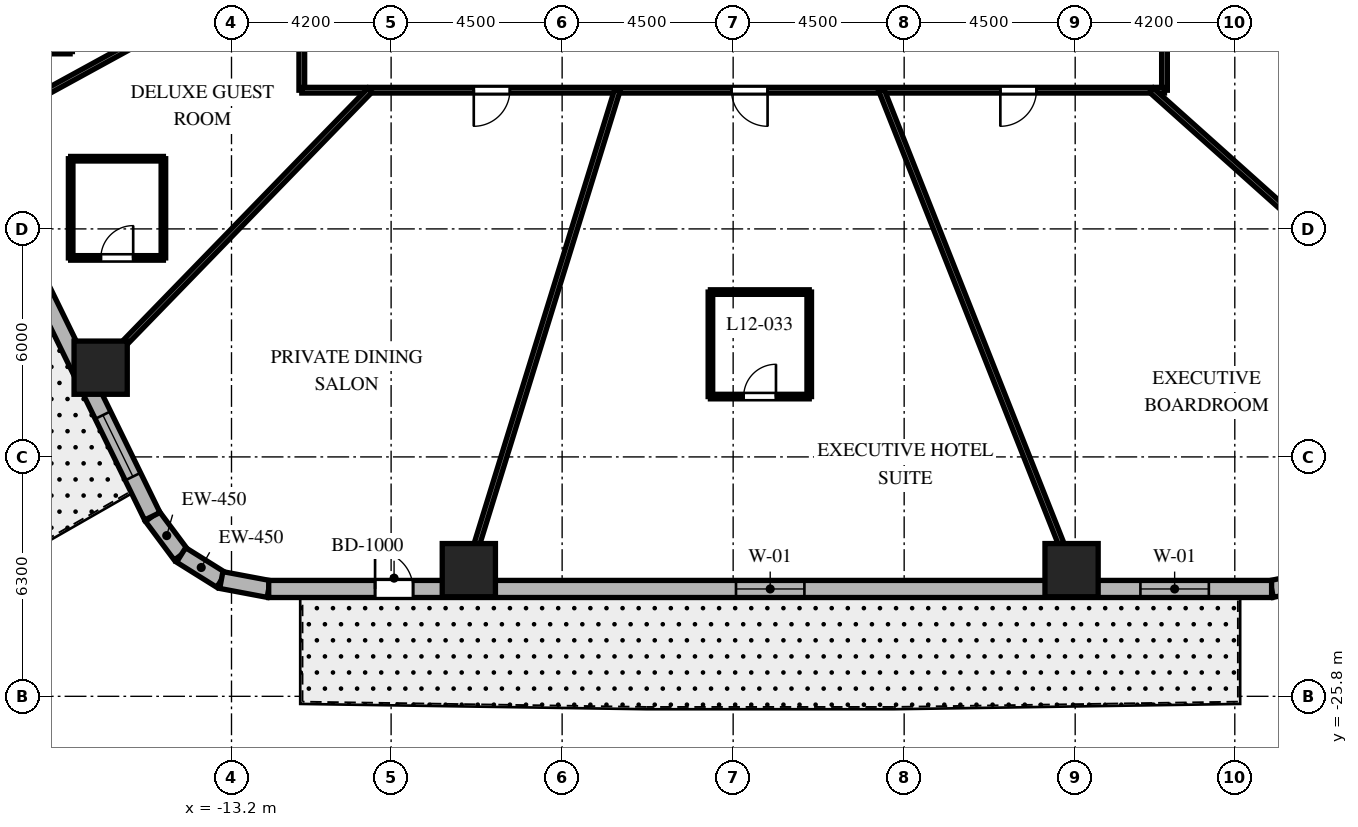
"""IFC4 building model, lengths in metres.
Left out: names, types, materials, properties, quantities, classifications, styles, units other than length and angle.
Written with IfcOpenShell. Run it as: python <this file> out.ifc"""

import sys

from ifc_helpers import new_model, si_unit, direction, frame, frame_2d, origin, origin_2d, place, context, subcontext, project, spatial, rectangle, extrude, element, fill, save


model = new_model("IFC4")
c1 = context("Model", 3, precision=1e-05, world=origin(), true_north=direction((0.0, 1.0)))
c2 = subcontext(c1, "Body", "Model", "MODEL_VIEW")
j1 = project(units=[si_unit("LENGTHUNIT", "METRE"), si_unit("PLANEANGLEUNIT", "RADIAN")], contexts=[c1])
p1 = place(None, origin())
s1 = spatial("IfcSite", under=j1, at=p1, CompositionType="ELEMENT")
p2 = place(p1, origin())
s2 = spatial("IfcBuilding", under=s1, at=p2, CompositionType="ELEMENT")
p3 = place(p2, frame((0.0, 0.0, 56.4)))
s3 = spatial("IfcBuildingStorey", under=s2, at=p3, CompositionType="ELEMENT", Elevation=56.4)
for number, where, z_axis, x_axis in (
    (1, (-6.955, -22.48, 0.0), (0.0, 0.0, 1.0), (1.0, 0.0, 0.0)),
    (2, (8.905, -22.48, 0.0), (0.0, 0.0, 1.0), (1.0, 0.0, 0.0)),
    (3, (-16.643, -17.152, 0.0), (0.0, 0.0, 1.0), (1.0, 0.0, 0.0)),
):
    element("IfcColumn", number, at=place(p3, frame(where, z_axis=z_axis, x_axis=x_axis)), inside=s3, PredefinedType="COLUMN", context=c2, shape_type="SweptSolid", body=[
        extrude(rectangle(XDim=1.4, YDim=1.4, at=origin_2d()), origin(), (0.0, 0.0, 1.0), 3.7),
    ])
p4 = place(p3, frame((-15.284, -21.062, 0.0), z_axis=(0.0, 0.0, 1.0), x_axis=(0.597595366449, -0.801797841104, 0.0)))
e4 = element("IfcWall", 4, at=p4, inside=s3, PredefinedType="SOLIDWALL", context=c2, shape_type="SweptSolid", body=[
    extrude(rectangle(XDim=1.269, YDim=0.45, at=frame_2d((0.634, 0.0))), origin(), (0.0, 0.0, 1.0), 3.4),
])
p5 = place(p3, frame((-14.526, -22.08, 0.0), z_axis=(0.0, 0.0, 1.0), x_axis=(0.848185203596, -0.529699783275, 0.0)))
e5 = element("IfcWall", 5, at=p5, inside=s3, PredefinedType="SOLIDWALL", context=c2, shape_type="SweptSolid", body=[
    extrude(rectangle(XDim=1.247, YDim=0.45, at=frame_2d((0.624, 0.0))), origin(), (0.0, 0.0, 1.0), 3.4),
])
p6 = place(p3, frame((-13.468, -22.74, 0.0), z_axis=(0.0, 0.0, 1.0), x_axis=(0.982717174228, -0.185113358451, 0.0)))
e6 = element("IfcWall", 6, at=p6, inside=s3, PredefinedType="SOLIDWALL", context=c2, shape_type="SweptSolid", body=[
    extrude(rectangle(XDim=1.269, YDim=0.45, at=frame_2d((0.634, 0.0))), origin(), (0.0, 0.0, 1.0), 3.4),
])
p7 = place(p3, frame((14.168, -22.975, 0.0), z_axis=(0.0, 0.0, 1.0), x_axis=(0.978770371074, 0.204959900243, 0.0)))
e7 = element("IfcWall", 7, at=p7, inside=s3, PredefinedType="SOLIDWALL", context=c2, shape_type="SweptSolid", body=[
    extrude(rectangle(XDim=1.406, YDim=0.45, at=frame_2d((0.703, 0.0))), origin(), (0.0, 0.0, 1.0), 3.4),
])
p8 = place(p3, frame((-12.221, -22.975, 0.0), z_axis=(0.0, 0.0, 1.0), x_axis=(1.0, 0.0, 0.0)))
e8 = element("IfcWall", 8, at=p8, inside=s3, PredefinedType="SOLIDWALL", context=c2, shape_type="SweptSolid", body=[
    extrude(rectangle(XDim=26.389, YDim=0.45, at=frame_2d((13.195, 0.0))), origin(), (0.0, 0.0, 1.0), 3.4),
])
p9 = place(p8, frame((2.799, 0.0, 0.0)))
e9 = element("IfcOpeningElement", 9, at=p9, cuts=e8, PredefinedType="OPENING", context=c2, shape_type="SweptSolid", body=[
    extrude(rectangle(XDim=1.0, YDim=2.15, at=frame_2d((0.5, 1.075))), frame((0.0, 0.235, 0.0), z_axis=(0.0, -1.0, 0.0), x_axis=(1.0, 0.0, 0.0)), (0.0, 0.0, 1.0), 0.47),
])
p10 = place(p8, frame((12.296, 0.0, 0.8)))
e10 = element("IfcOpeningElement", 10, at=p10, cuts=e8, PredefinedType="OPENING", context=c2, shape_type="SweptSolid", body=[
    extrude(rectangle(XDim=1.8, YDim=1.8, at=frame_2d((0.9, 0.9))), frame((0.0, 0.235, 0.0), z_axis=(0.0, -1.0, 0.0), x_axis=(1.0, 0.0, 0.0)), (0.0, 0.0, 1.0), 0.47),
])
p11 = place(p8, frame((22.938, 0.0, 0.8)))
e11 = element("IfcOpeningElement", 11, at=p11, cuts=e8, PredefinedType="OPENING", context=c2, shape_type="SweptSolid", body=[
    extrude(rectangle(XDim=1.8, YDim=1.8, at=frame_2d((0.9, 0.9))), frame((0.0, 0.235, 0.0), z_axis=(0.0, -1.0, 0.0), x_axis=(1.0, 0.0, 0.0)), (0.0, 0.0, 1.0), 0.47),
])
p12 = place(p3, frame((-24.336, -2.532, 0.0), z_axis=(0.0, 0.0, 1.0), x_axis=(0.438931326393, -0.898520612291, 0.0)))
e12 = element("IfcWall", 12, at=p12, inside=s3, PredefinedType="SOLIDWALL", context=c2, shape_type="SweptSolid", body=[
    extrude(rectangle(XDim=20.623, YDim=0.45, at=frame_2d((10.312, 0.0))), origin(), (0.0, 0.0, 1.0), 3.4),
])
p13 = place(p12, frame((5.171, 0.0, 0.0)))
e13 = element("IfcOpeningElement", 13, at=p13, cuts=e12, PredefinedType="OPENING", context=c2, shape_type="SweptSolid", body=[
    extrude(rectangle(XDim=0.95, YDim=2.15, at=frame_2d((0.475, 1.075))), frame((0.0, 0.235, 0.0), z_axis=(0.0, -1.0, 0.0), x_axis=(1.0, 0.0, 0.0)), (0.0, 0.0, 1.0), 0.47),
])
p14 = place(p12, frame((1.214, 0.0, 0.8)))
e14 = element("IfcOpeningElement", 14, at=p14, cuts=e12, PredefinedType="OPENING", context=c2, shape_type="SweptSolid", body=[
    extrude(rectangle(XDim=1.8, YDim=1.8, at=frame_2d((0.9, 0.9))), frame((0.0, 0.235, 0.0), z_axis=(0.0, -1.0, 0.0), x_axis=(1.0, 0.0, 0.0)), (0.0, 0.0, 1.0), 0.47),
])
p15 = place(p12, frame((6.8, 0.0, 0.8)))
e15 = element("IfcOpeningElement", 15, at=p15, cuts=e12, PredefinedType="OPENING", context=c2, shape_type="SweptSolid", body=[
    extrude(rectangle(XDim=1.8, YDim=1.8, at=frame_2d((0.9, 0.9))), frame((0.0, 0.235, 0.0), z_axis=(0.0, -1.0, 0.0), x_axis=(1.0, 0.0, 0.0)), (0.0, 0.0, 1.0), 0.47),
])
p16 = place(p12, frame((11.942, 0.0, 0.8)))
e16 = element("IfcOpeningElement", 16, at=p16, cuts=e12, PredefinedType="OPENING", context=c2, shape_type="SweptSolid", body=[
    extrude(rectangle(XDim=1.8, YDim=1.8, at=frame_2d((0.9, 0.9))), frame((0.0, 0.235, 0.0), z_axis=(0.0, -1.0, 0.0), x_axis=(1.0, 0.0, 0.0)), (0.0, 0.0, 1.0), 0.47),
])
p17 = place(p12, frame((17.66, 0.0, 0.8)))
e17 = element("IfcOpeningElement", 17, at=p17, cuts=e12, PredefinedType="OPENING", context=c2, shape_type="SweptSolid", body=[
    extrude(rectangle(XDim=1.8, YDim=1.8, at=frame_2d((0.9, 0.9))), frame((0.0, 0.235, 0.0), z_axis=(0.0, -1.0, 0.0), x_axis=(1.0, 0.0, 0.0)), (0.0, 0.0, 1.0), 0.47),
])
p18 = place(p3, frame((-11.35, -9.85, 0.0), z_axis=(0.0, 0.0, 1.0), x_axis=(0.0, 1.0, 0.0)))
e18 = element("IfcWall", 18, at=p18, inside=s3, PredefinedType="PARTITIONING", context=c2, shape_type="SweptSolid", body=[
    extrude(rectangle(XDim=19.7, YDim=0.15, at=frame_2d((9.85, 0.0))), origin(), (0.0, 0.0, 1.0), 2.84),
])
p19 = place(p18, frame((15.191, 0.0, 0.0)))
e19 = element("IfcOpeningElement", 19, at=p19, cuts=e18, PredefinedType="OPENING", context=c2, shape_type="SweptSolid", body=[
    extrude(rectangle(XDim=0.95, YDim=2.03, at=frame_2d((0.475, 1.015))), frame((0.0, 0.085, 0.0), z_axis=(0.0, -1.0, 0.0), x_axis=(1.0, 0.0, 0.0)), (0.0, 0.0, 1.0), 0.17),
])
p20 = place(p18, frame((8.838, 0.0, 0.0)))
e20 = element("IfcOpeningElement", 20, at=p20, cuts=e18, PredefinedType="OPENING", context=c2, shape_type="SweptSolid", body=[
    extrude(rectangle(XDim=0.95, YDim=2.03, at=frame_2d((0.475, 1.015))), frame((0.0, 0.085, 0.0), z_axis=(0.0, -1.0, 0.0), x_axis=(1.0, 0.0, 0.0)), (0.0, 0.0, 1.0), 0.17),
])
p21 = place(p18, frame((4.704, 0.0, 0.0)))
e21 = element("IfcOpeningElement", 21, at=p21, cuts=e18, PredefinedType="OPENING", context=c2, shape_type="SweptSolid", body=[
    extrude(rectangle(XDim=0.95, YDim=2.03, at=frame_2d((0.475, 1.015))), frame((0.0, 0.085, 0.0), z_axis=(0.0, -1.0, 0.0), x_axis=(1.0, 0.0, 0.0)), (0.0, 0.0, 1.0), 0.17),
])
p22 = place(p18, frame((1.462, 0.0, 0.0)))
e22 = element("IfcOpeningElement", 22, at=p22, cuts=e18, PredefinedType="OPENING", context=c2, shape_type="SweptSolid", body=[
    extrude(rectangle(XDim=0.95, YDim=2.03, at=frame_2d((0.475, 1.015))), frame((0.0, 0.085, 0.0), z_axis=(0.0, -1.0, 0.0), x_axis=(1.0, 0.0, 0.0)), (0.0, 0.0, 1.0), 0.17),
])
p23 = place(p3, frame((11.35, 9.85, 0.0), z_axis=(0.0, 0.0, 1.0), x_axis=(0.0, -1.0, 0.0)))
e23 = element("IfcWall", 23, at=p23, inside=s3, PredefinedType="PARTITIONING", context=c2, shape_type="SweptSolid", body=[
    extrude(rectangle(XDim=19.7, YDim=0.15, at=frame_2d((9.85, 0.0))), origin(), (0.0, 0.0, 1.0), 2.84),
])
p24 = place(p23, frame((4.704, 0.0, 0.0)))
e24 = element("IfcOpeningElement", 24, at=p24, cuts=e23, PredefinedType="OPENING", context=c2, shape_type="SweptSolid", body=[
    extrude(rectangle(XDim=0.95, YDim=2.03, at=frame_2d((0.475, 1.015))), frame((0.0, 0.085, 0.0), z_axis=(0.0, -1.0, 0.0), x_axis=(1.0, 0.0, 0.0)), (0.0, 0.0, 1.0), 0.17),
])
p25 = place(p23, frame((1.462, 0.0, 0.0)))
e25 = element("IfcOpeningElement", 25, at=p25, cuts=e23, PredefinedType="OPENING", context=c2, shape_type="SweptSolid", body=[
    extrude(rectangle(XDim=0.95, YDim=2.03, at=frame_2d((0.475, 1.015))), frame((0.0, 0.085, 0.0), z_axis=(0.0, -1.0, 0.0), x_axis=(1.0, 0.0, 0.0)), (0.0, 0.0, 1.0), 0.17),
])
p26 = place(p23, frame((15.191, 0.0, 0.0)))
e26 = element("IfcOpeningElement", 26, at=p26, cuts=e23, PredefinedType="OPENING", context=c2, shape_type="SweptSolid", body=[
    extrude(rectangle(XDim=0.95, YDim=2.03, at=frame_2d((0.475, 1.015))), frame((0.0, 0.085, 0.0), z_axis=(0.0, -1.0, 0.0), x_axis=(1.0, 0.0, 0.0)), (0.0, 0.0, 1.0), 0.17),
])
p27 = place(p23, frame((8.838, 0.0, 0.0)))
e27 = element("IfcOpeningElement", 27, at=p27, cuts=e23, PredefinedType="OPENING", context=c2, shape_type="SweptSolid", body=[
    extrude(rectangle(XDim=0.95, YDim=2.03, at=frame_2d((0.475, 1.015))), frame((0.0, 0.085, 0.0), z_axis=(0.0, -1.0, 0.0), x_axis=(1.0, 0.0, 0.0)), (0.0, 0.0, 1.0), 0.17),
])
p28 = place(p3, frame((11.35, -9.85, 0.0), z_axis=(0.0, 0.0, 1.0), x_axis=(-1.0, 0.0, 0.0)))
e28 = element("IfcWall", 28, at=p28, inside=s3, PredefinedType="PARTITIONING", context=c2, shape_type="SweptSolid", body=[
    extrude(rectangle(XDim=22.7, YDim=0.15, at=frame_2d((11.35, 0.0))), origin(), (0.0, 0.0, 1.0), 2.84),
])
p29 = place(p28, frame((17.225, 0.0, 0.0)))
e29 = element("IfcOpeningElement", 29, at=p29, cuts=e28, PredefinedType="OPENING", context=c2, shape_type="SweptSolid", body=[
    extrude(rectangle(XDim=0.95, YDim=2.03, at=frame_2d((0.475, 1.015))), frame((0.0, 0.085, 0.0), z_axis=(0.0, -1.0, 0.0), x_axis=(1.0, 0.0, 0.0)), (0.0, 0.0, 1.0), 0.17),
])
p30 = place(p28, frame((10.444, 0.0, 0.0)))
e30 = element("IfcOpeningElement", 30, at=p30, cuts=e28, PredefinedType="OPENING", context=c2, shape_type="SweptSolid", body=[
    extrude(rectangle(XDim=0.95, YDim=2.03, at=frame_2d((0.475, 1.015))), frame((0.0, 0.085, 0.0), z_axis=(0.0, -1.0, 0.0), x_axis=(1.0, 0.0, 0.0)), (0.0, 0.0, 1.0), 0.17),
])
p31 = place(p28, frame((3.369, 0.0, 0.0)))
e31 = element("IfcOpeningElement", 31, at=p31, cuts=e28, PredefinedType="OPENING", context=c2, shape_type="SweptSolid", body=[
    extrude(rectangle(XDim=0.95, YDim=2.03, at=frame_2d((0.475, 1.015))), frame((0.0, 0.085, 0.0), z_axis=(0.0, -1.0, 0.0), x_axis=(1.0, 0.0, 0.0)), (0.0, 0.0, 1.0), 0.17),
])
p32 = place(p3, frame((-11.35, -6.217, 0.0), z_axis=(0.0, 0.0, 1.0), x_axis=(-0.877047587135, -0.480403507378, 0.0)))
e32 = element("IfcWall", 32, at=p32, inside=s3, PredefinedType="PARTITIONING", context=c2, shape_type="SweptSolid", body=[
    extrude(rectangle(XDim=10.062, YDim=0.15, at=frame_2d((5.031, 0.0))), origin(), (0.0, 0.0, 1.0), 2.54),
])
p33 = place(p3, frame((-9.558, -9.85, 0.0), z_axis=(0.0, 0.0, 1.0), x_axis=(-0.69638346089, -0.717669893056, 0.0)))
e33 = element("IfcWall", 33, at=p33, inside=s3, PredefinedType="PARTITIONING", context=c2, shape_type="SweptSolid", body=[
    extrude(rectangle(XDim=10.701, YDim=0.15, at=frame_2d((5.351, 0.0))), origin(), (0.0, 0.0, 1.0), 2.54),
])
p34 = place(p3, frame((-3.048, -9.85, 0.0), z_axis=(0.0, 0.0, 1.0), x_axis=(-0.295553992761, -0.955326037206, 0.0)))
e34 = element("IfcWall", 34, at=p34, inside=s3, PredefinedType="PARTITIONING", context=c2, shape_type="SweptSolid", body=[
    extrude(rectangle(XDim=13.739, YDim=0.15, at=frame_2d((6.869, 0.0))), origin(), (0.0, 0.0, 1.0), 2.54),
])
p35 = place(p3, frame((3.902, -9.85, 0.0), z_axis=(0.0, 0.0, 1.0), x_axis=(0.36828765711, -0.929711891728, 0.0)))
e35 = element("IfcWall", 35, at=p35, inside=s3, PredefinedType="PARTITIONING", context=c2, shape_type="SweptSolid", body=[
    extrude(rectangle(XDim=14.117, YDim=0.15, at=frame_2d((7.059, 0.0))), origin(), (0.0, 0.0, 1.0), 2.54),
])
p36 = place(p3, frame((11.007, -9.85, 0.0), z_axis=(0.0, 0.0, 1.0), x_axis=(0.745177305978, -0.666866390407, 0.0)))
e36 = element("IfcWall", 36, at=p36, inside=s3, PredefinedType="PARTITIONING", context=c2, shape_type="SweptSolid", body=[
    extrude(rectangle(XDim=10.375, YDim=0.15, at=frame_2d((5.188, 0.0))), origin(), (0.0, 0.0, 1.0), 2.54),
])
p37 = place(p3, frame((-20.127, -8.833, 0.0), z_axis=(0.0, 0.0, 1.0), x_axis=(1.0, 0.0, 0.0)))
e37 = element("IfcWall", 37, at=p37, inside=s3, PredefinedType="PARTITIONING", context=c2, shape_type="SweptSolid", body=[
    extrude(rectangle(XDim=2.68, YDim=0.12, at=frame_2d((1.34, 0.0))), origin(), (0.0, 0.0, 1.0), 3.4),
])
p38 = place(p37, frame((0.915, 0.0, 0.0)))
e38 = element("IfcOpeningElement", 38, at=p38, cuts=e37, PredefinedType="OPENING", context=c2, shape_type="SweptSolid", body=[
    extrude(rectangle(XDim=0.85, YDim=2.03, at=frame_2d((0.425, 1.015))), frame((0.0, 0.07, 0.0), z_axis=(0.0, -1.0, 0.0), x_axis=(1.0, 0.0, 0.0)), (0.0, 0.0, 1.0), 0.14),
])
p39 = place(p3, frame((-17.432, -14.263, 0.0), z_axis=(0.0, 0.0, 1.0), x_axis=(1.0, 0.0, 0.0)))
e39 = element("IfcWall", 39, at=p39, inside=s3, PredefinedType="PARTITIONING", context=c2, shape_type="SweptSolid", body=[
    extrude(rectangle(XDim=2.44, YDim=0.12, at=frame_2d((1.22, 0.0))), origin(), (0.0, 0.0, 1.0), 3.4),
])
p40 = place(p39, frame((0.795, 0.0, 0.0)))
e40 = element("IfcOpeningElement", 40, at=p40, cuts=e39, PredefinedType="OPENING", context=c2, shape_type="SweptSolid", body=[
    extrude(rectangle(XDim=0.85, YDim=2.03, at=frame_2d((0.425, 1.015))), frame((0.0, 0.07, 0.0), z_axis=(0.0, -1.0, 0.0), x_axis=(1.0, 0.0, 0.0)), (0.0, 0.0, 1.0), 0.14),
])
p41 = place(p3, frame((-14.992, -14.263, 0.0), z_axis=(0.0, 0.0, 1.0), x_axis=(0.0, 1.0, 0.0)))
e41 = element("IfcWall", 41, at=p41, inside=s3, PredefinedType="PARTITIONING", context=c2, shape_type="SweptSolid", body=[
    extrude(rectangle(XDim=2.61, YDim=0.12, at=frame_2d((1.305, 0.0))), origin(), (0.0, 0.0, 1.0), 2.927),
])
p42 = place(p3, frame((-14.992, -11.653, 0.0), z_axis=(0.0, 0.0, 1.0), x_axis=(-1.0, 0.0, 0.0)))
e42 = element("IfcWall", 42, at=p42, inside=s3, PredefinedType="PARTITIONING", context=c2, shape_type="SweptSolid", body=[
    extrude(rectangle(XDim=2.44, YDim=0.12, at=frame_2d((1.22, 0.0))), origin(), (0.0, 0.0, 1.0), 2.927),
])
p43 = place(p3, frame((-17.432, -11.653, 0.0), z_axis=(0.0, 0.0, 1.0), x_axis=(0.0, -1.0, 0.0)))
e43 = element("IfcWall", 43, at=p43, inside=s3, PredefinedType="PARTITIONING", context=c2, shape_type="SweptSolid", body=[
    extrude(rectangle(XDim=2.61, YDim=0.12, at=frame_2d((1.305, 0.0))), origin(), (0.0, 0.0, 1.0), 3.4),
])
p44 = place(p3, frame((-0.598, -17.912, 0.0), z_axis=(0.0, 0.0, 1.0), x_axis=(1.0, 0.0, 0.0)))
e44 = element("IfcWall", 44, at=p44, inside=s3, PredefinedType="PARTITIONING", context=c2, shape_type="SweptSolid", body=[
    extrude(rectangle(XDim=2.6, YDim=0.12, at=frame_2d((1.3, 0.0))), origin(), (0.0, 0.0, 1.0), 3.4),
])
p45 = place(p44, frame((0.875, 0.0, 0.0)))
e45 = element("IfcOpeningElement", 45, at=p45, cuts=e44, PredefinedType="OPENING", context=c2, shape_type="SweptSolid", body=[
    extrude(rectangle(XDim=0.85, YDim=2.03, at=frame_2d((0.425, 1.015))), frame((0.0, 0.07, 0.0), z_axis=(0.0, -1.0, 0.0), x_axis=(1.0, 0.0, 0.0)), (0.0, 0.0, 1.0), 0.14),
])
p46 = place(p3, frame((2.002, -17.912, 0.0), z_axis=(0.0, 0.0, 1.0), x_axis=(0.0, 1.0, 0.0)))
e46 = element("IfcWall", 46, at=p46, inside=s3, PredefinedType="PARTITIONING", context=c2, shape_type="SweptSolid", body=[
    extrude(rectangle(XDim=2.75, YDim=0.12, at=frame_2d((1.375, 0.0))), origin(), (0.0, 0.0, 1.0), 2.841),
])
p47 = place(p3, frame((2.002, -15.162, 0.0), z_axis=(0.0, 0.0, 1.0), x_axis=(-1.0, 0.0, 0.0)))
e47 = element("IfcWall", 47, at=p47, inside=s3, PredefinedType="PARTITIONING", context=c2, shape_type="SweptSolid", body=[
    extrude(rectangle(XDim=2.6, YDim=0.12, at=frame_2d((1.3, 0.0))), origin(), (0.0, 0.0, 1.0), 3.4),
])
p48 = place(p3, frame((-0.598, -15.162, 0.0), z_axis=(0.0, 0.0, 1.0), x_axis=(0.0, -1.0, 0.0)))
e48 = element("IfcWall", 48, at=p48, inside=s3, PredefinedType="PARTITIONING", context=c2, shape_type="SweptSolid", body=[
    extrude(rectangle(XDim=2.75, YDim=0.12, at=frame_2d((1.375, 0.0))), origin(), (0.0, 0.0, 1.0), 2.841),
])
p49 = place(p9, origin())
e49 = element("IfcDoor", 49, at=p49, inside=s3, OperationType="SINGLE_SWING_LEFT", PredefinedType="DOOR", context=c2, shape_type="SweptSolid", body=[
    extrude(rectangle(XDim=1.0, YDim=2.15, at=frame_2d((0.5, 1.075))), frame((0.0, 0.025, 0.0), z_axis=(0.0, -1.0, 0.0), x_axis=(1.0, 0.0, 0.0)), (0.0, 0.0, 1.0), 0.05),
])
fill(e9, e49)
p50 = place(p10, origin())
e50 = element("IfcWindow", 50, at=p50, inside=s3, PartitioningType="SINGLE_PANEL", PredefinedType="WINDOW", context=c2, shape_type="SweptSolid", body=[
    extrude(rectangle(XDim=1.8, YDim=1.8, at=frame_2d((0.9, 0.9))), frame((0.0, 0.03, 0.0), z_axis=(0.0, -1.0, 0.0), x_axis=(1.0, 0.0, 0.0)), (0.0, 0.0, 1.0), 0.06),
])
fill(e10, e50)
p51 = place(p11, origin())
e51 = element("IfcWindow", 51, at=p51, inside=s3, PartitioningType="SINGLE_PANEL", PredefinedType="WINDOW", context=c2, shape_type="SweptSolid", body=[
    extrude(rectangle(XDim=1.8, YDim=1.8, at=frame_2d((0.9, 0.9))), frame((0.0, 0.03, 0.0), z_axis=(0.0, -1.0, 0.0), x_axis=(1.0, 0.0, 0.0)), (0.0, 0.0, 1.0), 0.06),
])
fill(e11, e51)
p52 = place(p17, origin())
e52 = element("IfcWindow", 52, at=p52, inside=s3, PartitioningType="SINGLE_PANEL", PredefinedType="WINDOW", context=c2, shape_type="SweptSolid", body=[
    extrude(rectangle(XDim=1.8, YDim=1.8, at=frame_2d((0.9, 0.9))), frame((0.0, 0.03, 0.0), z_axis=(0.0, -1.0, 0.0), x_axis=(1.0, 0.0, 0.0)), (0.0, 0.0, 1.0), 0.06),
])
fill(e17, e52)
p53 = place(p40, origin())
e53 = element("IfcDoor", 53, at=p53, inside=s3, OperationType="SINGLE_SWING_RIGHT", PredefinedType="DOOR", context=c2, shape_type="SweptSolid", body=[
    extrude(rectangle(XDim=0.85, YDim=2.03, at=frame_2d((0.425, 1.015))), frame((0.0, 0.025, 0.0), z_axis=(0.0, -1.0, 0.0), x_axis=(1.0, 0.0, 0.0)), (0.0, 0.0, 1.0), 0.05),
])
fill(e40, e53)
p54 = place(p29, origin())
e54 = element("IfcDoor", 54, at=p54, inside=s3, OperationType="SINGLE_SWING_RIGHT", PredefinedType="DOOR", context=c2, shape_type="SweptSolid", body=[
    extrude(rectangle(XDim=0.95, YDim=2.03, at=frame_2d((0.475, 1.015))), frame((0.0, 0.025, 0.0), z_axis=(0.0, -1.0, 0.0), x_axis=(1.0, 0.0, 0.0)), (0.0, 0.0, 1.0), 0.05),
])
fill(e29, e54)
p55 = place(p30, origin())
e55 = element("IfcDoor", 55, at=p55, inside=s3, OperationType="SINGLE_SWING_LEFT", PredefinedType="DOOR", context=c2, shape_type="SweptSolid", body=[
    extrude(rectangle(XDim=0.95, YDim=2.03, at=frame_2d((0.475, 1.015))), frame((0.0, 0.025, 0.0), z_axis=(0.0, -1.0, 0.0), x_axis=(1.0, 0.0, 0.0)), (0.0, 0.0, 1.0), 0.05),
])
fill(e30, e55)
p56 = place(p45, origin())
e56 = element("IfcDoor", 56, at=p56, inside=s3, OperationType="SINGLE_SWING_RIGHT", PredefinedType="DOOR", context=c2, shape_type="SweptSolid", body=[
    extrude(rectangle(XDim=0.85, YDim=2.03, at=frame_2d((0.425, 1.015))), frame((0.0, 0.025, 0.0), z_axis=(0.0, -1.0, 0.0), x_axis=(1.0, 0.0, 0.0)), (0.0, 0.0, 1.0), 0.05),
])
fill(e45, e56)
p57 = place(p31, origin())
e57 = element("IfcDoor", 57, at=p57, inside=s3, OperationType="SINGLE_SWING_RIGHT", PredefinedType="DOOR", context=c2, shape_type="SweptSolid", body=[
    extrude(rectangle(XDim=0.95, YDim=2.03, at=frame_2d((0.475, 1.015))), frame((0.0, 0.025, 0.0), z_axis=(0.0, -1.0, 0.0), x_axis=(1.0, 0.0, 0.0)), (0.0, 0.0, 1.0), 0.05),
])
fill(e31, e57)
save(model, sys.argv[1])
